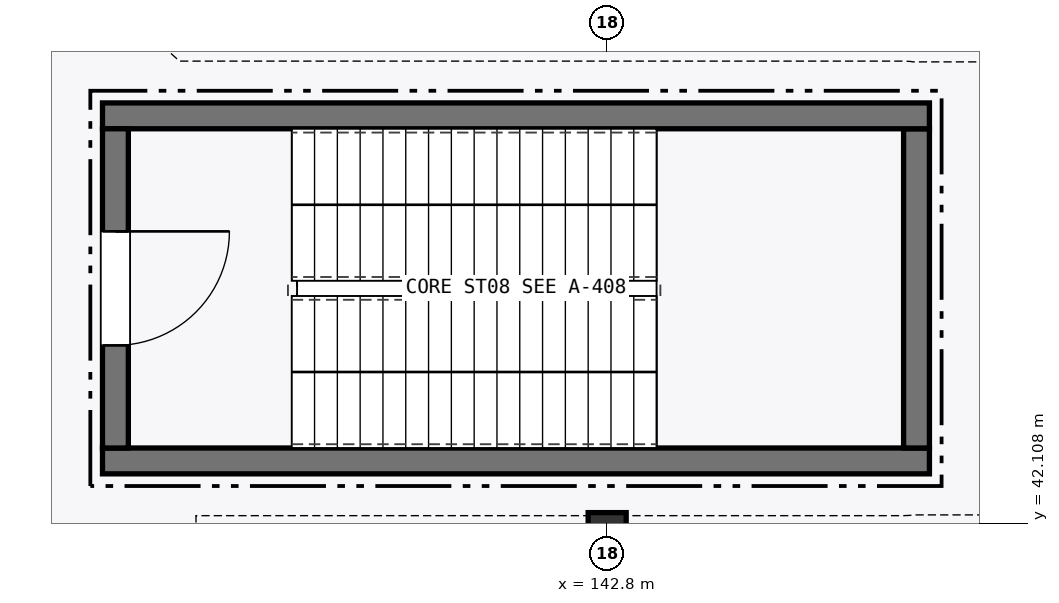
"""IFC4 building model, lengths in metres.
Left out: names, types, materials, properties, quantities, classifications, styles, units other than length and angle.
Written with IfcOpenShell. Run it as: python <this file> out.ifc"""

import sys

from ifc_helpers import new_model, si_unit, direction, frame, frame_2d, origin, origin_2d, place, context, subcontext, project, spatial, rectangle, hollow_rectangle, extrude, element, fill, save


model = new_model("IFC4")
c1 = context("Model", 3, precision=1e-05, world=origin(), true_north=direction((0.0, 1.0)))
c2 = subcontext(c1, "Body", "Model", "MODEL_VIEW")
j1 = project(units=[si_unit("LENGTHUNIT", "METRE"), si_unit("PLANEANGLEUNIT", "RADIAN")], contexts=[c1])
p1 = place(None, origin())
s1 = spatial("IfcSite", under=j1, at=p1, CompositionType="ELEMENT")
p2 = place(p1, origin())
s2 = spatial("IfcBuilding", under=s1, at=p2, CompositionType="ELEMENT")
p3 = place(p2, frame((0.0, 0.0, 11.4)))
s3 = spatial("IfcBuildingStorey", under=s2, at=p3, CompositionType="ELEMENT", Elevation=11.4)
p4 = place(p3, frame((142.8, 42.0, 0.0), z_axis=(0.0, 0.0, 1.0), x_axis=(1.0, 0.0, 0.0)))
e1 = element("IfcColumn", 1, at=p4, inside=s3, PredefinedType="COLUMN", context=c2, shape_type="SweptSolid", body=[
    extrude(hollow_rectangle(XDim=0.5, YDim=0.5, WallThickness=0.02, at=origin_2d()), origin(), (0.0, 0.0, 1.0), 5.1),
])
p5 = place(p3, frame((136.16, 42.93, 0.0), z_axis=(0.0, 0.0, 1.0), x_axis=(1.0, 0.0, 0.0)))
e2 = element("IfcWall", 2, at=p5, inside=s3, PredefinedType="SHEAR", context=c2, shape_type="SweptSolid", body=[
    extrude(rectangle(XDim=10.88, YDim=0.34, at=frame_2d((5.44, 0.0))), origin(), (0.0, 0.0, 1.0), 4.845),
])
p6 = place(p3, frame((146.87, 43.1, 0.0), z_axis=(0.0, 0.0, 1.0), x_axis=(0.0, 1.0, 0.0)))
e3 = element("IfcWall", 3, at=p6, inside=s3, PredefinedType="SHEAR", context=c2, shape_type="SweptSolid", body=[
    extrude(rectangle(XDim=4.2, YDim=0.34, at=frame_2d((2.1, 0.0))), origin(), (0.0, 0.0, 1.0), 4.845),
])
p7 = place(p3, frame((147.04, 47.47, 0.0), z_axis=(0.0, 0.0, 1.0), x_axis=(-1.0, 0.0, 0.0)))
e4 = element("IfcWall", 4, at=p7, inside=s3, PredefinedType="SHEAR", context=c2, shape_type="SweptSolid", body=[
    extrude(rectangle(XDim=10.88, YDim=0.34, at=frame_2d((5.44, 0.0))), origin(), (0.0, 0.0, 1.0), 4.845),
])
p8 = place(p3, frame((136.33, 47.3, 0.0), z_axis=(0.0, 0.0, 1.0), x_axis=(0.0, -1.0, 0.0)))
e5 = element("IfcWall", 5, at=p8, inside=s3, PredefinedType="SHEAR", context=c2, shape_type="SweptSolid", body=[
    extrude(rectangle(XDim=4.2, YDim=0.34, at=frame_2d((2.1, 0.0))), origin(), (0.0, 0.0, 1.0), 4.845),
])
p9 = place(p8, frame((1.35, 0.0, 0.0)))
e6 = element("IfcOpeningElement", 6, at=p9, cuts=e5, PredefinedType="OPENING", context=c2, shape_type="SweptSolid", body=[
    extrude(rectangle(XDim=1.5, YDim=2.15, at=frame_2d((0.75, 1.075))), frame((0.0, 0.18, 0.0), z_axis=(0.0, -1.0, 0.0), x_axis=(1.0, 0.0, 0.0)), (0.0, 0.0, 1.0), 0.36),
])
p10 = place(p9, origin())
e7 = element("IfcDoor", 7, at=p10, inside=s3, OperationType="SINGLE_SWING_LEFT", PredefinedType="DOOR", context=c2, shape_type="SweptSolid", body=[
    extrude(rectangle(XDim=1.5, YDim=2.15, at=frame_2d((0.75, 1.075))), frame((0.0, 0.025, 0.0), z_axis=(0.0, -1.0, 0.0), x_axis=(1.0, 0.0, 0.0)), (0.0, 0.0, 1.0), 0.05),
])
fill(e6, e7)
save(model, sys.argv[1])
